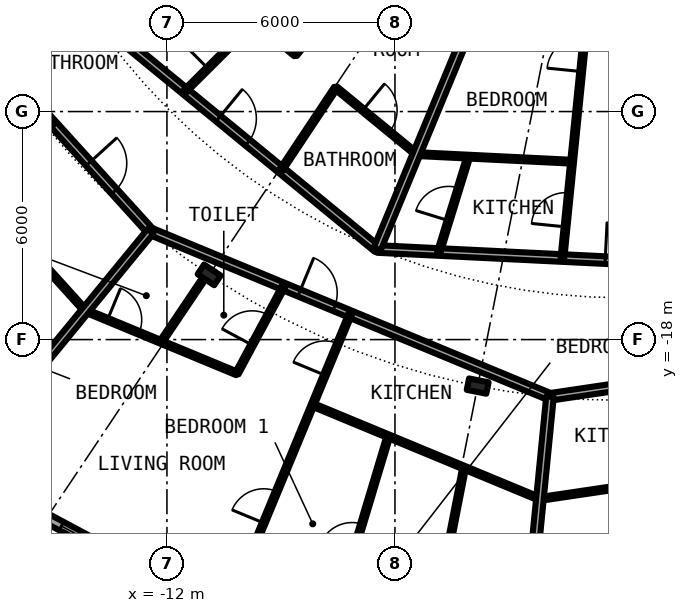
"""IFC4 building model, lengths in metres.
Left out: names, types, materials, properties, quantities, classifications, styles, units other than length and angle.
Written with IfcOpenShell. Run it as: python <this file> out.ifc"""

import sys

from ifc_helpers import new_model, si_unit, direction, frame, frame_2d, origin, origin_2d, place, context, subcontext, project, spatial, rectangle, i_section, extrude, element, fill, save


model = new_model("IFC4")
c1 = context("Model", 3, precision=1e-05, world=origin(), true_north=direction((0.0, 1.0)))
c2 = subcontext(c1, "Body", "Model", "MODEL_VIEW")
j1 = project(units=[si_unit("LENGTHUNIT", "METRE"), si_unit("PLANEANGLEUNIT", "RADIAN")], contexts=[c1])
p1 = place(None, origin())
s1 = spatial("IfcSite", under=j1, at=p1, CompositionType="ELEMENT")
p2 = place(p1, origin())
s2 = spatial("IfcBuilding", under=s1, at=p2, CompositionType="ELEMENT")
p3 = place(p2, frame((0.0, 0.0, 75.8)))
s3 = spatial("IfcBuildingStorey", under=s2, at=p3, CompositionType="ELEMENT", Elevation=75.8)
for number, where, z_axis, x_axis in (
    (1, (-10.889, -16.297, 0.0), (0.0, 0.0, 1.0), (-0.556, -0.831, 0.0)),
    (2, (-3.824, -19.223, 0.0), (0.0, 0.0, 1.0), (-0.195, -0.981, 0.0)),
):
    element("IfcColumn", number, at=place(p3, frame(where, z_axis=z_axis, x_axis=x_axis)), inside=s3, PredefinedType="COLUMN", context=c2, shape_type="SweptSolid", body=[
        extrude(i_section(OverallWidth=0.306, OverallDepth=0.524, WebThickness=0.021, FlangeThickness=0.04, FilletRadius=0.027, at=origin_2d()), origin(), (0.0, 0.0, 1.0), 3.05),
    ])
p4 = place(p3, frame((-15.167, -22.699, 0.0), z_axis=(0.0, 0.0, 1.0), x_axis=(0.881915646801, -0.471407246368, 0.0)))
e3 = element("IfcWall", 3, at=p4, inside=s3, PredefinedType="SOLIDWALL", context=c2, shape_type="SweptSolid", body=[
    extrude(rectangle(XDim=5.352, YDim=0.25, at=frame_2d((2.676, 0.0))), origin(), (0.0, 0.0, 1.0), 2.7),
])
p5 = place(p4, frame((0.441, 0.0, 0.3)))
e4 = element("IfcOpeningElement", 4, at=p5, cuts=e3, PredefinedType="OPENING", context=c2, shape_type="SweptSolid", body=[
    extrude(rectangle(XDim=1.8, YDim=2.1, at=frame_2d((0.9, 1.05))), frame((0.0, 0.135, 0.0), z_axis=(0.0, -1.0, 0.0), x_axis=(1.0, 0.0, 0.0)), (0.0, 0.0, 1.0), 0.27),
])
p6 = place(p4, frame((3.51, 0.0, 0.0)))
e5 = element("IfcOpeningElement", 5, at=p6, cuts=e3, PredefinedType="OPENING", context=c2, shape_type="SweptSolid", body=[
    extrude(rectangle(XDim=1.0, YDim=2.2, at=frame_2d((0.5, 1.1))), frame((0.0, 0.135, 0.0), z_axis=(0.0, -1.0, 0.0), x_axis=(1.0, 0.0, 0.0)), (0.0, 0.0, 1.0), 0.27),
])
p7 = place(p3, frame((-14.635, -23.126, -0.03), z_axis=(0.0, 0.0, 1.0), x_axis=(-0.534437802731, -0.845207805816, 0.0)))
e6 = element("IfcWall", 6, at=p7, inside=s3, PredefinedType="SOLIDWALL", context=c2, shape_type="SweptSolid", body=[
    extrude(rectangle(XDim=2.932, YDim=0.2, at=frame_2d((1.466, 0.0))), origin(), (0.0, 0.0, 1.0), 2.73),
])
p8 = place(p3, frame((-15.617, -15.617, 0.0), z_axis=(0.0, 0.0, 1.0), x_axis=(0.671144831591, -0.741326254107, 0.0)))
e7 = element("IfcWall", 7, at=p8, inside=s3, PredefinedType="PARTITIONING", context=c2, shape_type="SweptSolid", body=[
    extrude(rectangle(XDim=2.181, YDim=0.1, at=frame_2d((1.091, 0.0))), origin(), (0.0, 0.0, 1.0), 2.7),
])
p9 = place(p3, frame((-2.186, -22.193, 0.0), z_axis=(0.0, 0.0, 1.0), x_axis=(0.989171386505, 0.146765009863, 0.0)))
e8 = element("IfcWall", 8, at=p9, inside=s3, PredefinedType="PARTITIONING", context=c2, shape_type="SweptSolid", body=[
    extrude(rectangle(XDim=4.335, YDim=0.1, at=frame_2d((2.167, 0.0))), origin(), (0.0, 0.0, 1.0), 2.7),
])
p10 = place(p3, frame((-14.15, -17.236, 0.0), z_axis=(0.0, 0.0, 1.0), x_axis=(0.923789421174, -0.382900907975, 0.0)))
e9 = element("IfcWall", 9, at=p10, inside=s3, PredefinedType="PARTITIONING", context=c2, shape_type="SweptSolid", body=[
    extrude(rectangle(XDim=4.319, YDim=0.1, at=frame_2d((2.16, 0.0))), origin(), (0.0, 0.0, 1.0), 2.7),
])
p11 = place(p10, frame((0.634, 0.0, 0.0)))
e10 = element("IfcOpeningElement", 10, at=p11, cuts=e9, PredefinedType="OPENING", context=c2, shape_type="SweptSolid", body=[
    extrude(rectangle(XDim=0.9, YDim=2.3, at=frame_2d((0.45, 1.15))), frame((0.0, 0.06, 0.0), z_axis=(0.0, -1.0, 0.0), x_axis=(1.0, 0.0, 0.0)), (0.0, 0.0, 1.0), 0.12),
])
p12 = place(p3, frame((-8.168, -19.716, 0.0), z_axis=(0.0, 0.0, 1.0), x_axis=(0.923791567638, -0.382895729358, 0.0)))
e11 = element("IfcWall", 11, at=p12, inside=s3, PredefinedType="PARTITIONING", context=c2, shape_type="SweptSolid", body=[
    extrude(rectangle(XDim=6.474, YDim=0.1, at=frame_2d((3.237, 0.0))), origin(), (0.0, 0.0, 1.0), 2.7),
])
p13 = place(p3, frame((-16.193, -11.004, 0.0), z_axis=(0.0, 0.0, 1.0), x_axis=(0.671601747072, -0.740912338492, 0.0)))
e12 = element("IfcWall", 12, at=p13, inside=s3, PredefinedType="PARTITIONING", context=c2, shape_type="SweptSolid", body=[
    extrude(rectangle(XDim=5.597, YDim=0.2, at=frame_2d((2.799, 0.0))), origin(), (0.0, 0.0, 1.0), 2.38),
])
p14 = place(p13, frame((3.18, 0.0, 0.0)))
e13 = element("IfcOpeningElement", 13, at=p14, cuts=e12, PredefinedType="OPENING", context=c2, shape_type="SweptSolid", body=[
    extrude(rectangle(XDim=1.0, YDim=2.3, at=frame_2d((0.5, 1.15))), frame((0.0, 0.11, 0.0), z_axis=(0.0, -1.0, 0.0), x_axis=(1.0, 0.0, 0.0)), (0.0, 0.0, 1.0), 0.22),
])
p15 = place(p3, frame((-1.918, -19.507, 0.0), z_axis=(0.0, 0.0, 1.0), x_axis=(0.989144916871, 0.146943300045, 0.0)))
e14 = element("IfcWall", 14, at=p15, inside=s3, PredefinedType="PARTITIONING", context=c2, shape_type="SweptSolid", body=[
    extrude(rectangle(XDim=9.529, YDim=0.2, at=frame_2d((4.764, 0.0))), origin(), (0.0, 0.0, 1.0), 2.38),
])
p16 = place(p15, frame((4.261, 0.0, 0.0)))
e15 = element("IfcOpeningElement", 15, at=p16, cuts=e14, PredefinedType="OPENING", context=c2, shape_type="SweptSolid", body=[
    extrude(rectangle(XDim=1.0, YDim=2.3, at=frame_2d((0.5, 1.15))), frame((0.0, 0.11, 0.0), z_axis=(0.0, -1.0, 0.0), x_axis=(1.0, 0.0, 0.0)), (0.0, 0.0, 1.0), 0.22),
])
p17 = place(p3, frame((-12.436, -15.15, 0.0), z_axis=(0.0, 0.0, 1.0), x_axis=(0.923858130651, -0.38273509694, 0.0)))
e16 = element("IfcWall", 16, at=p17, inside=s3, PredefinedType="PARTITIONING", context=c2, shape_type="SweptSolid", body=[
    extrude(rectangle(XDim=11.382, YDim=0.2, at=frame_2d((5.691, 0.0))), origin(), (0.0, 0.0, 1.0), 2.7),
])
p18 = place(p17, frame((4.239, 0.0, 0.0)))
e17 = element("IfcOpeningElement", 17, at=p18, cuts=e16, PredefinedType="OPENING", context=c2, shape_type="SweptSolid", body=[
    extrude(rectangle(XDim=1.0, YDim=2.3, at=frame_2d((0.5, 1.15))), frame((0.0, 0.11, 0.0), z_axis=(0.0, -1.0, 0.0), x_axis=(1.0, 0.0, 0.0)), (0.0, 0.0, 1.0), 0.22),
])
p19 = place(p3, frame((-14.05, -9.392, 0.0), z_axis=(0.0, 0.0, 1.0), x_axis=(0.773074935257, -0.634314704605, 0.0)))
e18 = element("IfcWall", 18, at=p19, inside=s3, PredefinedType="PARTITIONING", context=c2, shape_type="SweptSolid", body=[
    extrude(rectangle(XDim=9.809, YDim=0.2, at=frame_2d((4.904, 0.0))), origin(), (0.0, 0.0, 1.0), 2.7),
])
p20 = place(p19, frame((4.402, 0.0, 0.0)))
e19 = element("IfcOpeningElement", 19, at=p20, cuts=e18, PredefinedType="OPENING", context=c2, shape_type="SweptSolid", body=[
    extrude(rectangle(XDim=1.0, YDim=2.3, at=frame_2d((0.5, 1.15))), frame((0.0, 0.11, 0.0), z_axis=(0.0, -1.0, 0.0), x_axis=(1.0, 0.0, 0.0)), (0.0, 0.0, 1.0), 0.22),
])
p21 = place(p3, frame((-6.464, -15.616, 0.0), z_axis=(0.0, 0.0, 1.0), x_axis=(0.998805876564, -0.048855101495, 0.0)))
e20 = element("IfcWall", 20, at=p21, inside=s3, PredefinedType="PARTITIONING", context=c2, shape_type="SweptSolid", body=[
    extrude(rectangle(XDim=11.384, YDim=0.2, at=frame_2d((5.692, 0.0))), origin(), (0.0, 0.0, 1.0), 2.7),
])
p22 = place(p21, frame((6.004, 0.0, 0.0)))
e21 = element("IfcOpeningElement", 21, at=p22, cuts=e20, PredefinedType="OPENING", context=c2, shape_type="SweptSolid", body=[
    extrude(rectangle(XDim=1.0, YDim=2.3, at=frame_2d((0.5, 1.15))), frame((0.0, 0.11, 0.0), z_axis=(0.0, -1.0, 0.0), x_axis=(1.0, 0.0, 0.0)), (0.0, 0.0, 1.0), 0.22),
])
p23 = place(p3, frame((-10.093, -9.296, 0.0), z_axis=(0.0, 0.0, 1.0), x_axis=(0.772957368531, -0.6344579627, 0.0)))
e22 = element("IfcWall", 22, at=p23, inside=s3, PredefinedType="PARTITIONING", context=c2, shape_type="SweptSolid", body=[
    extrude(rectangle(XDim=1.906, YDim=0.1, at=frame_2d((0.953, 0.0))), origin(), (0.0, 0.0, 1.0), 2.7),
])
p24 = place(p3, frame((-7.558, -11.376, 0.0), z_axis=(0.0, 0.0, 1.0), x_axis=(0.773049907698, -0.634345205868, 0.0)))
e23 = element("IfcWall", 23, at=p24, inside=s3, PredefinedType="PARTITIONING", context=c2, shape_type="SweptSolid", body=[
    extrude(rectangle(XDim=2.748, YDim=0.1, at=frame_2d((1.374, 0.0))), origin(), (0.0, 0.0, 1.0), 2.7),
])
p25 = place(p24, frame((0.924, 0.0, 0.0)))
e24 = element("IfcOpeningElement", 24, at=p25, cuts=e23, PredefinedType="OPENING", context=c2, shape_type="SweptSolid", body=[
    extrude(rectangle(XDim=0.9, YDim=2.3, at=frame_2d((0.45, 1.15))), frame((0.0, 0.06, 0.0), z_axis=(0.0, -1.0, 0.0), x_axis=(1.0, 0.0, 0.0)), (0.0, 0.0, 1.0), 0.12),
])
p26 = place(p3, frame((-5.434, -13.119, 0.0), z_axis=(0.0, 0.0, 1.0), x_axis=(0.998795469779, -0.049067398026, 0.0)))
e25 = element("IfcWall", 25, at=p26, inside=s3, PredefinedType="PARTITIONING", context=c2, shape_type="SweptSolid", body=[
    extrude(rectangle(XDim=4.1, YDim=0.1, at=frame_2d((2.05, 0.0))), origin(), (0.0, 0.0, 1.0), 2.7),
])
p27 = place(p3, frame((-17.239, -21.008, 0.0), z_axis=(0.0, 0.0, 1.0), x_axis=(0.634318093068, 0.773072154981, 0.0)))
e26 = element("IfcWall", 26, at=p27, inside=s3, PredefinedType="PARTITIONING", context=c2, shape_type="SweptSolid", body=[
    extrude(rectangle(XDim=7.576, YDim=0.2, at=frame_2d((3.788, 0.0))), origin(), (0.0, 0.0, 1.0), 2.7),
])
p28 = place(p3, frame((-17.077, -14.006, 0.0), z_axis=(0.0, 0.0, 1.0), x_axis=(0.77319617123, 0.634166918717, 0.0)))
e27 = element("IfcWall", 27, at=p28, inside=s3, PredefinedType="PARTITIONING", context=c2, shape_type="SweptSolid", body=[
    extrude(rectangle(XDim=2.675, YDim=0.1, at=frame_2d((1.337, 0.0))), origin(), (0.0, 0.0, 1.0), 2.7),
])
p29 = place(p28, frame((0.887, 0.0, 0.0)))
e28 = element("IfcOpeningElement", 28, at=p29, cuts=e27, PredefinedType="OPENING", context=c2, shape_type="SweptSolid", body=[
    extrude(rectangle(XDim=0.9, YDim=2.3, at=frame_2d((0.45, 1.15))), frame((0.0, 0.06, 0.0), z_axis=(0.0, -1.0, 0.0), x_axis=(1.0, 0.0, 0.0)), (0.0, 0.0, 1.0), 0.12),
])
p30 = place(p3, frame((-12.153, -18.064, 0.0), z_axis=(0.0, 0.0, 1.0), x_axis=(0.558383137663, 0.829583191472, 0.0)))
e29 = element("IfcWall", 29, at=p30, inside=s3, PredefinedType="PARTITIONING", context=c2, shape_type="SweptSolid", body=[
    extrude(rectangle(XDim=1.909, YDim=0.1, at=frame_2d((0.955, 0.0))), origin(), (0.0, 0.0, 1.0), 2.7),
])
p31 = place(p3, frame((-11.524, -11.464, 0.0), z_axis=(0.0, 0.0, 1.0), x_axis=(0.708796844581, 0.705412668665, 0.0)))
e30 = element("IfcWall", 30, at=p31, inside=s3, PredefinedType="PARTITIONING", context=c2, shape_type="SweptSolid", body=[
    extrude(rectangle(XDim=2.597, YDim=0.1, at=frame_2d((1.299, 0.0))), origin(), (0.0, 0.0, 1.0), 2.7),
])
p32 = place(p31, frame((0.849, 0.0, 0.0)))
e31 = element("IfcOpeningElement", 31, at=p32, cuts=e30, PredefinedType="OPENING", context=c2, shape_type="SweptSolid", body=[
    extrude(rectangle(XDim=0.9, YDim=2.3, at=frame_2d((0.45, 1.15))), frame((0.0, 0.06, 0.0), z_axis=(0.0, -1.0, 0.0), x_axis=(1.0, 0.0, 0.0)), (0.0, 0.0, 1.0), 0.12),
])
p33 = place(p3, frame((-10.399, -25.106, 0.0), z_axis=(0.0, 0.0, 1.0), x_axis=(0.382697543868, 0.923873687209, 0.0)))
e32 = element("IfcWall", 32, at=p33, inside=s3, PredefinedType="PARTITIONING", context=c2, shape_type="SweptSolid", body=[
    extrude(rectangle(XDim=8.419, YDim=0.1, at=frame_2d((4.209, 0.0))), origin(), (0.0, 0.0, 1.0), 2.7),
])
p34 = place(p33, frame((6.678, 0.0, 0.0)))
e33 = element("IfcOpeningElement", 33, at=p34, cuts=e32, PredefinedType="OPENING", context=c2, shape_type="SweptSolid", body=[
    extrude(rectangle(XDim=0.9, YDim=2.3, at=frame_2d((0.45, 1.15))), frame((0.0, 0.06, 0.0), z_axis=(0.0, -1.0, 0.0), x_axis=(1.0, 0.0, 0.0)), (0.0, 0.0, 1.0), 0.12),
])
p35 = place(p33, frame((2.468, 0.0, 0.0)))
e34 = element("IfcOpeningElement", 34, at=p35, cuts=e32, PredefinedType="OPENING", context=c2, shape_type="SweptSolid", body=[
    extrude(rectangle(XDim=0.9, YDim=2.3, at=frame_2d((0.45, 1.15))), frame((0.0, 0.06, 0.0), z_axis=(0.0, -1.0, 0.0), x_axis=(1.0, 0.0, 0.0)), (0.0, 0.0, 1.0), 0.12),
])
p36 = place(p3, frame((-10.16, -18.89, 0.0), z_axis=(0.0, 0.0, 1.0), x_axis=(0.4736792609, 0.880697426925, 0.0)))
e35 = element("IfcWall", 35, at=p36, inside=s3, PredefinedType="PARTITIONING", context=c2, shape_type="SweptSolid", body=[
    extrude(rectangle(XDim=2.597, YDim=0.1, at=frame_2d((1.298, 0.0))), origin(), (0.0, 0.0, 1.0), 2.7),
])
p37 = place(p36, frame((0.848, 0.0, 0.0)))
e36 = element("IfcOpeningElement", 36, at=p37, cuts=e35, PredefinedType="OPENING", context=c2, shape_type="SweptSolid", body=[
    extrude(rectangle(XDim=0.9, YDim=2.3, at=frame_2d((0.45, 1.15))), frame((0.0, 0.06, 0.0), z_axis=(0.0, -1.0, 0.0), x_axis=(1.0, 0.0, 0.0)), (0.0, 0.0, 1.0), 0.12),
])
p38 = place(p3, frame((-8.996, -13.539, 0.0), z_axis=(0.0, 0.0, 1.0), x_axis=(0.553615197403, 0.83277260594, 0.0)))
e37 = element("IfcWall", 37, at=p38, inside=s3, PredefinedType="PARTITIONING", context=c2, shape_type="SweptSolid", body=[
    extrude(rectangle(XDim=2.597, YDim=0.1, at=frame_2d((1.299, 0.0))), origin(), (0.0, 0.0, 1.0), 2.7),
])
p39 = place(p3, frame((-8.62, -10.504, 0.0), z_axis=(0.0, 0.0, 1.0), x_axis=(0.634358693064, 0.773038840249, 0.0)))
e38 = element("IfcWall", 38, at=p39, inside=s3, PredefinedType="PARTITIONING", context=c2, shape_type="SweptSolid", body=[
    extrude(rectangle(XDim=5.868, YDim=0.1, at=frame_2d((2.934, 0.0))), origin(), (0.0, 0.0, 1.0), 2.7),
])
p40 = place(p39, frame((2.484, 0.0, 0.0)))
e39 = element("IfcOpeningElement", 39, at=p40, cuts=e38, PredefinedType="OPENING", context=c2, shape_type="SweptSolid", body=[
    extrude(rectangle(XDim=0.9, YDim=2.3, at=frame_2d((0.45, 1.15))), frame((0.0, 0.06, 0.0), z_axis=(0.0, -1.0, 0.0), x_axis=(1.0, 0.0, 0.0)), (0.0, 0.0, 1.0), 0.12),
])
p41 = place(p3, frame((-7.821, -26.025, 0.0), z_axis=(0.0, 0.0, 1.0), x_axis=(0.287793773423, 0.957692405723, 0.0)))
e40 = element("IfcWall", 40, at=p41, inside=s3, PredefinedType="PARTITIONING", context=c2, shape_type="SweptSolid", body=[
    extrude(rectangle(XDim=5.726, YDim=0.1, at=frame_2d((2.863, 0.0))), origin(), (0.0, 0.0, 1.0), 2.7),
])
p42 = place(p41, frame((2.413, 0.0, 0.0)))
e41 = element("IfcOpeningElement", 41, at=p42, cuts=e40, PredefinedType="OPENING", context=c2, shape_type="SweptSolid", body=[
    extrude(rectangle(XDim=0.9, YDim=2.3, at=frame_2d((0.45, 1.15))), frame((0.0, 0.06, 0.0), z_axis=(0.0, -1.0, 0.0), x_axis=(1.0, 0.0, 0.0)), (0.0, 0.0, 1.0), 0.12),
])
p43 = place(p3, frame((-6.467, -15.614, 0.0), z_axis=(0.0, 0.0, 1.0), x_axis=(0.382646942224, 0.923894646378, 0.0)))
e42 = element("IfcWall", 42, at=p43, inside=s3, PredefinedType="PARTITIONING", context=c2, shape_type="SweptSolid", body=[
    extrude(rectangle(XDim=9.181, YDim=0.2, at=frame_2d((4.59, 0.0))), origin(), (0.0, 0.0, 1.0), 2.7),
])
p44 = place(p3, frame((-5.217, -26.67, 0.0), z_axis=(0.0, 0.0, 1.0), x_axis=(0.192109041462, 0.981373586453, 0.0)))
e43 = element("IfcWall", 43, at=p44, inside=s3, PredefinedType="PARTITIONING", context=c2, shape_type="SweptSolid", body=[
    extrude(rectangle(XDim=5.404, YDim=0.1, at=frame_2d((2.702, 0.0))), origin(), (0.0, 0.0, 1.0), 2.7),
])
p45 = place(p44, frame((2.252, 0.0, 0.0)))
e44 = element("IfcOpeningElement", 44, at=p45, cuts=e43, PredefinedType="OPENING", context=c2, shape_type="SweptSolid", body=[
    extrude(rectangle(XDim=0.9, YDim=2.3, at=frame_2d((0.45, 1.15))), frame((0.0, 0.06, 0.0), z_axis=(0.0, -1.0, 0.0), x_axis=(1.0, 0.0, 0.0)), (0.0, 0.0, 1.0), 0.12),
])
p46 = place(p3, frame((-4.843, -15.693, 0.0), z_axis=(0.0, 0.0, 1.0), x_axis=(0.294961884541, 0.955509019669, 0.0)))
e45 = element("IfcWall", 45, at=p46, inside=s3, PredefinedType="PARTITIONING", context=c2, shape_type="SweptSolid", body=[
    extrude(rectangle(XDim=2.624, YDim=0.1, at=frame_2d((1.312, 0.0))), origin(), (0.0, 0.0, 1.0), 2.7),
])
p47 = place(p46, frame((0.862, 0.0, 0.0)))
e46 = element("IfcOpeningElement", 46, at=p47, cuts=e45, PredefinedType="OPENING", context=c2, shape_type="SweptSolid", body=[
    extrude(rectangle(XDim=0.9, YDim=2.3, at=frame_2d((0.45, 1.15))), frame((0.0, 0.06, 0.0), z_axis=(0.0, -1.0, 0.0), x_axis=(1.0, 0.0, 0.0)), (0.0, 0.0, 1.0), 0.12),
])
p48 = place(p3, frame((-2.664, -27.044, 0.0), z_axis=(0.0, 0.0, 1.0), x_axis=(0.098115395479, 0.995175044487, 0.0)))
e47 = element("IfcWall", 47, at=p48, inside=s3, PredefinedType="PARTITIONING", context=c2, shape_type="SweptSolid", body=[
    extrude(rectangle(XDim=7.574, YDim=0.2, at=frame_2d((3.787, 0.0))), origin(), (0.0, 0.0, 1.0), 2.7),
])
p49 = place(p3, frame((-1.593, -15.853, 0.0), z_axis=(0.0, 0.0, 1.0), x_axis=(0.100083483356, 0.994979043176, 0.0)))
e48 = element("IfcWall", 48, at=p49, inside=s3, PredefinedType="PARTITIONING", context=c2, shape_type="SweptSolid", body=[
    extrude(rectangle(XDim=8.213, YDim=0.1, at=frame_2d((4.107, 0.0))), origin(), (0.0, 0.0, 1.0), 2.7),
])
p50 = place(p49, frame((0.823, 0.0, 0.0)))
e49 = element("IfcOpeningElement", 49, at=p50, cuts=e48, PredefinedType="OPENING", context=c2, shape_type="SweptSolid", body=[
    extrude(rectangle(XDim=0.9, YDim=2.3, at=frame_2d((0.45, 1.15))), frame((0.0, 0.06, 0.0), z_axis=(0.0, -1.0, 0.0), x_axis=(1.0, 0.0, 0.0)), (0.0, 0.0, 1.0), 0.12),
])
p51 = place(p49, frame((4.931, 0.0, 0.0)))
e50 = element("IfcOpeningElement", 50, at=p51, cuts=e48, PredefinedType="OPENING", context=c2, shape_type="SweptSolid", body=[
    extrude(rectangle(XDim=0.9, YDim=2.3, at=frame_2d((0.45, 1.15))), frame((0.0, 0.06, 0.0), z_axis=(0.0, -1.0, 0.0), x_axis=(1.0, 0.0, 0.0)), (0.0, 0.0, 1.0), 0.12),
])
p52 = place(p5, origin())
e51 = element("IfcWindow", 51, at=p52, inside=s3, PartitioningType="SINGLE_PANEL", PredefinedType="WINDOW", context=c2, shape_type="SweptSolid", body=[
    extrude(rectangle(XDim=1.8, YDim=2.1, at=frame_2d((0.9, 1.05))), frame((0.0, 0.03, 0.0), z_axis=(0.0, -1.0, 0.0), x_axis=(1.0, 0.0, 0.0)), (0.0, 0.0, 1.0), 0.06),
])
fill(e4, e51)
p53 = place(p14, origin())
e52 = element("IfcDoor", 52, at=p53, inside=s3, OperationType="SINGLE_SWING_RIGHT", PredefinedType="DOOR", context=c2, shape_type="SweptSolid", body=[
    extrude(rectangle(XDim=1.0, YDim=2.3, at=frame_2d((0.5, 1.15))), frame((0.0, 0.025, 0.0), z_axis=(0.0, -1.0, 0.0), x_axis=(1.0, 0.0, 0.0)), (0.0, 0.0, 1.0), 0.05),
])
fill(e13, e52)
p54 = place(p18, origin())
e53 = element("IfcDoor", 53, at=p54, inside=s3, OperationType="SINGLE_SWING_LEFT", PredefinedType="DOOR", context=c2, shape_type="SweptSolid", body=[
    extrude(rectangle(XDim=1.0, YDim=2.3, at=frame_2d((0.5, 1.15))), frame((0.0, 0.025, 0.0), z_axis=(0.0, -1.0, 0.0), x_axis=(1.0, 0.0, 0.0)), (0.0, 0.0, 1.0), 0.05),
])
fill(e17, e53)
p55 = place(p11, origin())
e54 = element("IfcDoor", 54, at=p55, inside=s3, OperationType="SINGLE_SWING_LEFT", PredefinedType="DOOR", context=c2, shape_type="SweptSolid", body=[
    extrude(rectangle(XDim=0.9, YDim=2.3, at=frame_2d((0.45, 1.15))), frame((0.0, 0.025, 0.0), z_axis=(0.0, -1.0, 0.0), x_axis=(1.0, 0.0, 0.0)), (0.0, 0.0, 1.0), 0.05),
])
fill(e10, e54)
p56 = place(p37, origin())
e55 = element("IfcDoor", 55, at=p56, inside=s3, OperationType="SINGLE_SWING_LEFT", PredefinedType="DOOR", context=c2, shape_type="SweptSolid", body=[
    extrude(rectangle(XDim=0.9, YDim=2.3, at=frame_2d((0.45, 1.15))), frame((0.0, 0.025, 0.0), z_axis=(0.0, -1.0, 0.0), x_axis=(1.0, 0.0, 0.0)), (0.0, 0.0, 1.0), 0.05),
])
fill(e36, e55)
p57 = place(p34, origin())
e56 = element("IfcDoor", 56, at=p57, inside=s3, OperationType="SINGLE_SWING_RIGHT", PredefinedType="DOOR", context=c2, shape_type="SweptSolid", body=[
    extrude(rectangle(XDim=0.9, YDim=2.3, at=frame_2d((0.45, 1.15))), frame((0.0, 0.025, 0.0), z_axis=(0.0, -1.0, 0.0), x_axis=(1.0, 0.0, 0.0)), (0.0, 0.0, 1.0), 0.05),
])
fill(e33, e56)
p58 = place(p35, origin())
e57 = element("IfcDoor", 57, at=p58, inside=s3, OperationType="SINGLE_SWING_LEFT", PredefinedType="DOOR", context=c2, shape_type="SweptSolid", body=[
    extrude(rectangle(XDim=0.9, YDim=2.3, at=frame_2d((0.45, 1.15))), frame((0.0, 0.025, 0.0), z_axis=(0.0, -1.0, 0.0), x_axis=(1.0, 0.0, 0.0)), (0.0, 0.0, 1.0), 0.05),
])
fill(e34, e57)
p59 = place(p42, origin())
e58 = element("IfcDoor", 58, at=p59, inside=s3, OperationType="SINGLE_SWING_LEFT", PredefinedType="DOOR", context=c2, shape_type="SweptSolid", body=[
    extrude(rectangle(XDim=0.9, YDim=2.3, at=frame_2d((0.45, 1.15))), frame((0.0, 0.025, 0.0), z_axis=(0.0, -1.0, 0.0), x_axis=(1.0, 0.0, 0.0)), (0.0, 0.0, 1.0), 0.05),
])
fill(e41, e58)
p60 = place(p20, origin())
e59 = element("IfcDoor", 59, at=p60, inside=s3, OperationType="SINGLE_SWING_LEFT", PredefinedType="DOOR", context=c2, shape_type="SweptSolid", body=[
    extrude(rectangle(XDim=1.0, YDim=2.3, at=frame_2d((0.5, 1.15))), frame((0.0, 0.025, 0.0), z_axis=(0.0, -1.0, 0.0), x_axis=(1.0, 0.0, 0.0)), (0.0, 0.0, 1.0), 0.05),
])
fill(e19, e59)
p61 = place(p25, origin())
e60 = element("IfcDoor", 60, at=p61, inside=s3, OperationType="SINGLE_SWING_LEFT", PredefinedType="DOOR", context=c2, shape_type="SweptSolid", body=[
    extrude(rectangle(XDim=0.9, YDim=2.3, at=frame_2d((0.45, 1.15))), frame((0.0, 0.025, 0.0), z_axis=(0.0, -1.0, 0.0), x_axis=(1.0, 0.0, 0.0)), (0.0, 0.0, 1.0), 0.05),
])
fill(e24, e60)
p62 = place(p32, origin())
e61 = element("IfcDoor", 61, at=p62, inside=s3, OperationType="SINGLE_SWING_RIGHT", PredefinedType="DOOR", context=c2, shape_type="SweptSolid", body=[
    extrude(rectangle(XDim=0.9, YDim=2.3, at=frame_2d((0.45, 1.15))), frame((0.0, 0.025, 0.0), z_axis=(0.0, -1.0, 0.0), x_axis=(1.0, 0.0, 0.0)), (0.0, 0.0, 1.0), 0.05),
])
fill(e31, e61)
p63 = place(p22, origin())
e62 = element("IfcDoor", 62, at=p63, inside=s3, OperationType="SINGLE_SWING_RIGHT", PredefinedType="DOOR", context=c2, shape_type="SweptSolid", body=[
    extrude(rectangle(XDim=1.0, YDim=2.3, at=frame_2d((0.5, 1.15))), frame((0.0, 0.025, 0.0), z_axis=(0.0, -1.0, 0.0), x_axis=(1.0, 0.0, 0.0)), (0.0, 0.0, 1.0), 0.05),
])
fill(e21, e62)
p64 = place(p50, origin())
e63 = element("IfcDoor", 63, at=p64, inside=s3, OperationType="SINGLE_SWING_LEFT", PredefinedType="DOOR", context=c2, shape_type="SweptSolid", body=[
    extrude(rectangle(XDim=0.9, YDim=2.3, at=frame_2d((0.45, 1.15))), frame((0.0, 0.025, 0.0), z_axis=(0.0, -1.0, 0.0), x_axis=(1.0, 0.0, 0.0)), (0.0, 0.0, 1.0), 0.05),
])
fill(e49, e63)
p65 = place(p47, origin())
e64 = element("IfcDoor", 64, at=p65, inside=s3, OperationType="SINGLE_SWING_RIGHT", PredefinedType="DOOR", context=c2, shape_type="SweptSolid", body=[
    extrude(rectangle(XDim=0.9, YDim=2.3, at=frame_2d((0.45, 1.15))), frame((0.0, 0.025, 0.0), z_axis=(0.0, -1.0, 0.0), x_axis=(1.0, 0.0, 0.0)), (0.0, 0.0, 1.0), 0.05),
])
fill(e46, e64)
p66 = place(p51, origin())
e65 = element("IfcDoor", 65, at=p66, inside=s3, OperationType="SINGLE_SWING_RIGHT", PredefinedType="DOOR", context=c2, shape_type="SweptSolid", body=[
    extrude(rectangle(XDim=0.9, YDim=2.3, at=frame_2d((0.45, 1.15))), frame((0.0, 0.025, 0.0), z_axis=(0.0, -1.0, 0.0), x_axis=(1.0, 0.0, 0.0)), (0.0, 0.0, 1.0), 0.05),
])
fill(e50, e65)
save(model, sys.argv[1])
